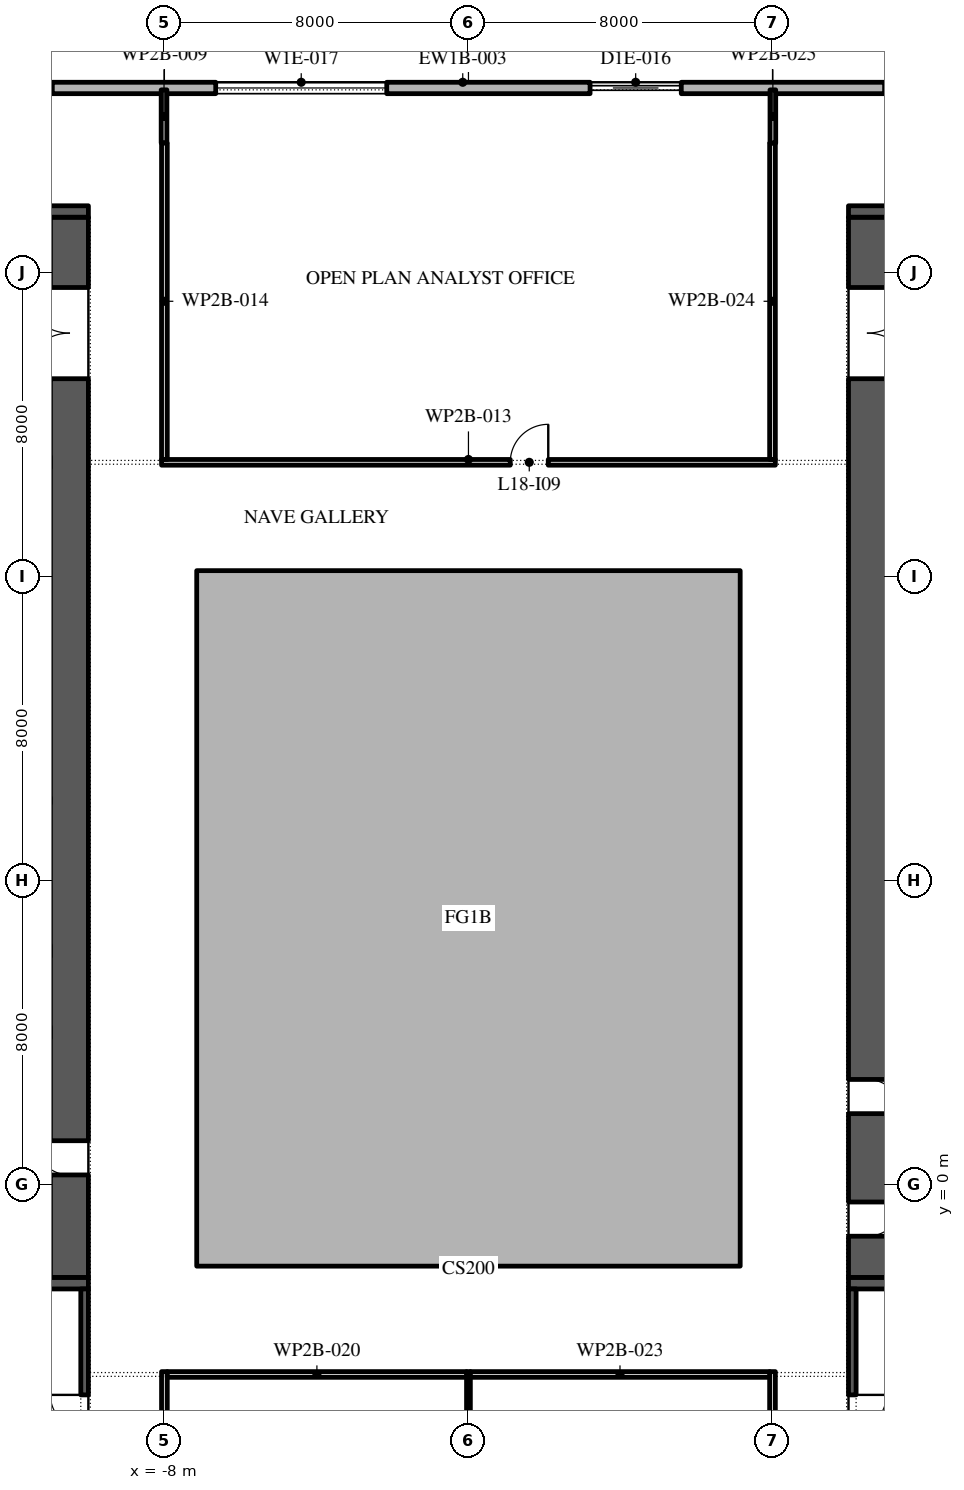
"""IFC4 building model, lengths in metres.
Left out: names, types, materials, properties, quantities, classifications, styles, units other than length and angle.
Written with IfcOpenShell. Run it as: python <this file> out.ifc"""

import sys

from ifc_helpers import new_model, si_unit, direction, frame, frame_2d, origin, place, context, subcontext, project, spatial, polyline, rectangle, outline, extrude, element, fill, save


model = new_model("IFC4")
c1 = context("Model", 3, precision=1e-05, world=origin(), true_north=direction((0.0, 1.0)))
c2 = subcontext(c1, "Body", "Model", "MODEL_VIEW")
j1 = project(units=[si_unit("LENGTHUNIT", "METRE"), si_unit("PLANEANGLEUNIT", "RADIAN")], contexts=[c1])
p1 = place(None, origin())
s1 = spatial("IfcSite", under=j1, at=p1, CompositionType="ELEMENT")
p2 = place(p1, origin())
s2 = spatial("IfcBuilding", under=s1, at=p2, CompositionType="ELEMENT")
p3 = place(p2, frame((0.0, 0.0, 85.8)))
s3 = spatial("IfcBuildingStorey", under=s2, at=p3, CompositionType="ELEMENT", Elevation=85.8)
p4 = place(p3, origin())
e1 = element("IfcWall", 1, at=p4, inside=s3, PredefinedType="STANDARD", context=c2, shape_type="SweptSolid", body=[
    extrude(outline(polyline([(-7.15, -2.15), (7.15, -2.15), (7.15, 16.15), (-7.15, 16.15), (-7.15, -2.15)]), holes=[polyline([(-7.0, -2.0), (-7.0, 16.0), (7.0, 16.0), (7.0, -2.0), (-7.0, -2.0)])]), origin(), (0.0, 0.0, 1.0), 3.95),
])
p5 = place(p3, frame((26.1, 28.85, 0.0), z_axis=(0.0, 0.0, 1.0), x_axis=(-1.0, 0.0, 0.0)))
e2 = element("IfcWall", 2, at=p5, inside=s3, PredefinedType="STANDARD", context=c2, shape_type="SweptSolid", body=[
    extrude(rectangle(XDim=52.5, YDim=0.3, at=frame_2d((26.25, 0.0))), origin(), (0.0, 0.0, 1.0), 3.95),
])
p6 = place(p5, frame((2.0, 0.0, 0.45)))
e3 = element("IfcOpeningElement", 3, at=p6, cuts=e2, PredefinedType="OPENING", context=c2, shape_type="SweptSolid", body=[
    extrude(rectangle(XDim=4.5, YDim=2.825, at=frame_2d((2.25, 1.413))), frame((0.0, 0.16, 0.0), z_axis=(0.0, -1.0, 0.0), x_axis=(1.0, 0.0, 0.0)), (0.0, 0.0, 1.0), 0.32),
])
p7 = place(p5, frame((10.65, 0.0, 0.45)))
e4 = element("IfcOpeningElement", 4, at=p7, cuts=e2, PredefinedType="OPENING", context=c2, shape_type="SweptSolid", body=[
    extrude(rectangle(XDim=4.5, YDim=3.05, at=frame_2d((2.25, 1.525))), frame((0.0, 0.16, 0.0), z_axis=(0.0, -1.0, 0.0), x_axis=(1.0, 0.0, 0.0)), (0.0, 0.0, 1.0), 0.32),
])
p8 = place(p5, frame((20.5, 0.0, 0.0)))
e5 = element("IfcOpeningElement", 5, at=p8, cuts=e2, PredefinedType="OPENING", context=c2, shape_type="SweptSolid", body=[
    extrude(rectangle(XDim=2.4, YDim=3.275, at=frame_2d((1.2, 1.637))), frame((0.0, 0.16, 0.0), z_axis=(0.0, -1.0, 0.0), x_axis=(1.0, 0.0, 0.0)), (0.0, 0.0, 1.0), 0.32),
])
p9 = place(p5, frame((28.25, 0.0, 0.45)))
e6 = element("IfcOpeningElement", 6, at=p9, cuts=e2, PredefinedType="OPENING", context=c2, shape_type="SweptSolid", body=[
    extrude(rectangle(XDim=4.5, YDim=2.825, at=frame_2d((2.25, 1.413))), frame((0.0, 0.16, 0.0), z_axis=(0.0, -1.0, 0.0), x_axis=(1.0, 0.0, 0.0)), (0.0, 0.0, 1.0), 0.32),
])
p10 = place(p5, frame((37.05, 0.0, 0.45)))
e7 = element("IfcOpeningElement", 7, at=p10, cuts=e2, PredefinedType="OPENING", context=c2, shape_type="SweptSolid", body=[
    extrude(rectangle(XDim=4.5, YDim=3.05, at=frame_2d((2.25, 1.525))), frame((0.0, 0.16, 0.0), z_axis=(0.0, -1.0, 0.0), x_axis=(1.0, 0.0, 0.0)), (0.0, 0.0, 1.0), 0.32),
])
p11 = place(p5, frame((45.85, 0.0, 0.45)))
e8 = element("IfcOpeningElement", 8, at=p11, cuts=e2, PredefinedType="OPENING", context=c2, shape_type="SweptSolid", body=[
    extrude(rectangle(XDim=4.5, YDim=2.825, at=frame_2d((2.25, 1.413))), frame((0.0, 0.16, 0.0), z_axis=(0.0, -1.0, 0.0), x_axis=(1.0, 0.0, 0.0)), (0.0, 0.0, 1.0), 0.32),
])
p12 = place(p3, frame((-10.5, -2.45, 0.0), z_axis=(0.0, 0.0, 1.0), x_axis=(0.0, 1.0, 0.0)))
e9 = element("IfcWall", 9, at=p12, inside=s3, PredefinedType="SHEAR", context=c2, shape_type="SweptSolid", body=[
    extrude(rectangle(XDim=27.9, YDim=1.0, at=frame_2d((13.95, 0.0))), origin(), (0.0, 0.0, 1.0), 3.95),
])
p13 = place(p12, frame((23.65, 0.0, 0.0)))
e10 = element("IfcOpeningElement", 10, at=p13, cuts=e9, PredefinedType="OPENING", context=c2, shape_type="SweptSolid", body=[
    extrude(rectangle(XDim=2.4, YDim=2.1, at=frame_2d((1.2, 1.05))), frame((0.0, 0.51, 0.0), z_axis=(0.0, -1.0, 0.0), x_axis=(1.0, 0.0, 0.0)), (0.0, 0.0, 1.0), 1.02),
])
p14 = place(p12, frame((2.7, 0.0, 0.0)))
e11 = element("IfcOpeningElement", 11, at=p14, cuts=e9, PredefinedType="OPENING", context=c2, shape_type="SweptSolid", body=[
    extrude(rectangle(XDim=0.9, YDim=2.1, at=frame_2d((0.45, 1.05))), frame((0.0, 0.51, 0.0), z_axis=(0.0, -1.0, 0.0), x_axis=(1.0, 0.0, 0.0)), (0.0, 0.0, 1.0), 1.02),
])
for number, where, z_axis, x_axis in (
    (12, (-22.0, -2.6, 0.0), (0.0, 0.0, 1.0), (1.0, 0.0, 0.0)),
    (13, (-22.0, 25.6, 0.0), (0.0, 0.0, 1.0), (1.0, 0.0, 0.0)),
):
    element("IfcWall", number, at=place(p3, frame(where, z_axis=z_axis, x_axis=x_axis)), inside=s3, PredefinedType="SHEAR", context=c2, shape_type="SweptSolid", body=[
        extrude(rectangle(XDim=12.0, YDim=0.3, at=frame_2d((6.0, 0.0))), origin(), (0.0, 0.0, 1.0), 3.95),
    ])
p15 = place(p3, frame((-10.1, -15.8, 0.0), z_axis=(0.0, 0.0, 1.0), x_axis=(0.0, 1.0, 0.0)))
e14 = element("IfcWall", 14, at=p15, inside=s3, PredefinedType="SHEAR", context=c2, shape_type="SweptSolid", body=[
    extrude(rectangle(XDim=13.05, YDim=0.2, at=frame_2d((6.525, 0.0))), origin(), (0.0, 0.0, 1.0), 3.95),
])
p16 = place(p15, frame((1.175, 0.0, 0.0)))
e15 = element("IfcOpeningElement", 15, at=p16, cuts=e14, PredefinedType="OPENING", context=c2, shape_type="SweptSolid", body=[
    extrude(rectangle(XDim=0.9, YDim=2.1, at=frame_2d((0.45, 1.05))), frame((0.0, 0.11, 0.0), z_axis=(0.0, -1.0, 0.0), x_axis=(1.0, 0.0, 0.0)), (0.0, 0.0, 1.0), 0.22),
])
p17 = place(p15, frame((4.413, 0.0, 0.0)))
e16 = element("IfcOpeningElement", 16, at=p17, cuts=e14, PredefinedType="OPENING", context=c2, shape_type="SweptSolid", body=[
    extrude(rectangle(XDim=1.0, YDim=2.1, at=frame_2d((0.5, 1.05))), frame((0.0, 0.11, 0.0), z_axis=(0.0, -1.0, 0.0), x_axis=(1.0, 0.0, 0.0)), (0.0, 0.0, 1.0), 0.22),
])
p18 = place(p15, frame((9.363, 0.0, 0.0)))
e17 = element("IfcOpeningElement", 17, at=p18, cuts=e14, PredefinedType="OPENING", context=c2, shape_type="SweptSolid", body=[
    extrude(rectangle(XDim=0.9, YDim=2.1, at=frame_2d((0.45, 1.05))), frame((0.0, 0.11, 0.0), z_axis=(0.0, -1.0, 0.0), x_axis=(1.0, 0.0, 0.0)), (0.0, 0.0, 1.0), 0.22),
])
p19 = place(p3, frame((10.5, -2.45, 0.0), z_axis=(0.0, 0.0, 1.0), x_axis=(0.0, 1.0, 0.0)))
e18 = element("IfcWall", 18, at=p19, inside=s3, PredefinedType="SHEAR", context=c2, shape_type="SweptSolid", body=[
    extrude(rectangle(XDim=27.9, YDim=1.0, at=frame_2d((13.95, 0.0))), origin(), (0.0, 0.0, 1.0), 3.95),
])
p20 = place(p19, frame((23.65, 0.0, 0.0)))
e19 = element("IfcOpeningElement", 19, at=p20, cuts=e18, PredefinedType="OPENING", context=c2, shape_type="SweptSolid", body=[
    extrude(rectangle(XDim=2.4, YDim=2.1, at=frame_2d((1.2, 1.05))), frame((0.0, 0.51, 0.0), z_axis=(0.0, -1.0, 0.0), x_axis=(1.0, 0.0, 0.0)), (0.0, 0.0, 1.0), 1.02),
])
p21 = place(p19, frame((1.087, 0.0, 0.0)))
e20 = element("IfcOpeningElement", 20, at=p21, cuts=e18, PredefinedType="OPENING", context=c2, shape_type="SweptSolid", body=[
    extrude(rectangle(XDim=0.9, YDim=2.1, at=frame_2d((0.45, 1.05))), frame((0.0, 0.51, 0.0), z_axis=(0.0, -1.0, 0.0), x_axis=(1.0, 0.0, 0.0)), (0.0, 0.0, 1.0), 1.02),
])
p22 = place(p19, frame((4.312, 0.0, 0.0)))
e21 = element("IfcOpeningElement", 21, at=p22, cuts=e18, PredefinedType="OPENING", context=c2, shape_type="SweptSolid", body=[
    extrude(rectangle(XDim=0.9, YDim=2.1, at=frame_2d((0.45, 1.05))), frame((0.0, 0.51, 0.0), z_axis=(0.0, -1.0, 0.0), x_axis=(1.0, 0.0, 0.0)), (0.0, 0.0, 1.0), 1.02),
])
for number, where, z_axis, x_axis in (
    (22, (10.0, -2.6, 0.0), (0.0, 0.0, 1.0), (1.0, 0.0, 0.0)),
    (23, (10.0, 25.6, 0.0), (0.0, 0.0, 1.0), (1.0, 0.0, 0.0)),
):
    element("IfcWall", number, at=place(p3, frame(where, z_axis=z_axis, x_axis=x_axis)), inside=s3, PredefinedType="SHEAR", context=c2, shape_type="SweptSolid", body=[
        extrude(rectangle(XDim=12.0, YDim=0.3, at=frame_2d((6.0, 0.0))), origin(), (0.0, 0.0, 1.0), 3.95),
    ])
p23 = place(p3, frame((10.1, -15.8, 0.0), z_axis=(0.0, 0.0, 1.0), x_axis=(0.0, 1.0, 0.0)))
e24 = element("IfcWall", 24, at=p23, inside=s3, PredefinedType="SHEAR", context=c2, shape_type="SweptSolid", body=[
    extrude(rectangle(XDim=13.05, YDim=0.2, at=frame_2d((6.525, 0.0))), origin(), (0.0, 0.0, 1.0), 3.95),
])
p24 = place(p23, frame((2.762, 0.0, 0.0)))
e25 = element("IfcOpeningElement", 25, at=p24, cuts=e24, PredefinedType="OPENING", context=c2, shape_type="SweptSolid", body=[
    extrude(rectangle(XDim=0.9, YDim=2.1, at=frame_2d((0.45, 1.05))), frame((0.0, 0.11, 0.0), z_axis=(0.0, -1.0, 0.0), x_axis=(1.0, 0.0, 0.0)), (0.0, 0.0, 1.0), 0.22),
])
p25 = place(p23, frame((9.363, 0.0, 0.0)))
e26 = element("IfcOpeningElement", 26, at=p25, cuts=e24, PredefinedType="OPENING", context=c2, shape_type="SweptSolid", body=[
    extrude(rectangle(XDim=0.9, YDim=2.1, at=frame_2d((0.45, 1.05))), frame((0.0, 0.11, 0.0), z_axis=(0.0, -1.0, 0.0), x_axis=(1.0, 0.0, 0.0)), (0.0, 0.0, 1.0), 0.22),
])
p26 = place(p3, frame((-8.01, 28.8, 0.0), z_axis=(0.0, 0.0, 1.0), x_axis=(0.0, -1.0, 0.0)))
e27 = element("IfcWall", 27, at=p26, inside=s3, PredefinedType="PARTITIONING", context=c2, shape_type="SweptSolid", body=[
    extrude(rectangle(XDim=1.4, YDim=0.15, at=frame_2d((0.7, 0.0))), origin(), (0.0, 0.0, 1.0), 3.95),
])
p27 = place(p3, frame((-8.0, -4.925, 0.0), z_axis=(0.0, 0.0, 1.0), x_axis=(0.0, -1.0, 0.0)))
e28 = element("IfcWall", 28, at=p27, inside=s3, PredefinedType="PARTITIONING", context=c2, shape_type="SweptSolid", body=[
    extrude(rectangle(XDim=9.625, YDim=0.15, at=frame_2d((4.812, 0.0))), origin(), (0.0, 0.0, 1.0), 3.95),
])
p28 = place(p27, frame((6.175, 0.0, 0.0)))
e29 = element("IfcOpeningElement", 29, at=p28, cuts=e28, PredefinedType="OPENING", context=c2, shape_type="SweptSolid", body=[
    extrude(rectangle(XDim=1.0, YDim=2.1, at=frame_2d((0.5, 1.05))), frame((0.0, 0.085, 0.0), z_axis=(0.0, -1.0, 0.0), x_axis=(1.0, 0.0, 0.0)), (0.0, 0.0, 1.0), 0.17),
])
p29 = place(p3, frame((-8.075, 19.0, 0.0), z_axis=(0.0, 0.0, 1.0), x_axis=(1.0, 0.0, 0.0)))
e30 = element("IfcWall", 30, at=p29, inside=s3, PredefinedType="PARTITIONING", context=c2, shape_type="SweptSolid", body=[
    extrude(rectangle(XDim=16.15, YDim=0.15, at=frame_2d((8.075, 0.0))), origin(), (0.0, 0.0, 1.0), 3.95),
])
p30 = place(p29, frame((9.175, 0.0, 0.0)))
e31 = element("IfcOpeningElement", 31, at=p30, cuts=e30, PredefinedType="OPENING", context=c2, shape_type="SweptSolid", body=[
    extrude(rectangle(XDim=1.0, YDim=2.1, at=frame_2d((0.5, 1.05))), frame((0.0, 0.085, 0.0), z_axis=(0.0, -1.0, 0.0), x_axis=(1.0, 0.0, 0.0)), (0.0, 0.0, 1.0), 0.17),
])
p31 = place(p3, frame((-8.0, 27.4, 0.0), z_axis=(0.0, 0.0, 1.0), x_axis=(0.0, -1.0, 0.0)))
e32 = element("IfcWall", 32, at=p31, inside=s3, PredefinedType="PARTITIONING", context=c2, shape_type="SweptSolid", body=[
    extrude(rectangle(XDim=8.325, YDim=0.15, at=frame_2d((4.163, 0.0))), origin(), (0.0, 0.0, 1.0), 3.95),
])
p32 = place(p3, frame((0.0, -14.05, 0.0), z_axis=(0.0, 0.0, 1.0), x_axis=(0.0, 1.0, 0.0)))
e33 = element("IfcWall", 33, at=p32, inside=s3, PredefinedType="PARTITIONING", context=c2, shape_type="SweptSolid", body=[
    extrude(rectangle(XDim=9.125, YDim=0.1, at=frame_2d((4.562, 0.0))), origin(), (0.0, 0.0, 1.0), 3.95),
])
p33 = place(p3, frame((-0.05, -5.0, 0.0), z_axis=(0.0, 0.0, 1.0), x_axis=(-1.0, 0.0, 0.0)))
e34 = element("IfcWall", 34, at=p33, inside=s3, PredefinedType="PARTITIONING", context=c2, shape_type="SweptSolid", body=[
    extrude(rectangle(XDim=7.875, YDim=0.15, at=frame_2d((3.938, 0.0))), origin(), (0.0, 0.0, 1.0), 3.95),
])
p34 = place(p3, frame((8.0, -13.95, 0.0), z_axis=(0.0, 0.0, 1.0), x_axis=(0.0, 1.0, 0.0)))
e35 = element("IfcWall", 35, at=p34, inside=s3, PredefinedType="PARTITIONING", context=c2, shape_type="SweptSolid", body=[
    extrude(rectangle(XDim=9.025, YDim=0.15, at=frame_2d((4.512, 0.0))), origin(), (0.0, 0.0, 1.0), 3.95),
])
p35 = place(p34, frame((4.05, 0.0, 0.0)))
e36 = element("IfcOpeningElement", 36, at=p35, cuts=e35, PredefinedType="OPENING", context=c2, shape_type="SweptSolid", body=[
    extrude(rectangle(XDim=1.0, YDim=2.1, at=frame_2d((0.5, 1.05))), frame((0.0, 0.085, 0.0), z_axis=(0.0, -1.0, 0.0), x_axis=(1.0, 0.0, 0.0)), (0.0, 0.0, 1.0), 0.17),
])
p36 = place(p3, frame((7.925, -5.0, 0.0), z_axis=(0.0, 0.0, 1.0), x_axis=(-1.0, 0.0, 0.0)))
e37 = element("IfcWall", 37, at=p36, inside=s3, PredefinedType="PARTITIONING", context=c2, shape_type="SweptSolid", body=[
    extrude(rectangle(XDim=7.875, YDim=0.15, at=frame_2d((3.938, 0.0))), origin(), (0.0, 0.0, 1.0), 3.95),
])
p37 = place(p3, frame((8.0, 19.075, 0.0), z_axis=(0.0, 0.0, 1.0), x_axis=(0.0, 1.0, 0.0)))
e38 = element("IfcWall", 38, at=p37, inside=s3, PredefinedType="PARTITIONING", context=c2, shape_type="SweptSolid", body=[
    extrude(rectangle(XDim=8.325, YDim=0.15, at=frame_2d((4.163, 0.0))), origin(), (0.0, 0.0, 1.0), 3.95),
])
p38 = place(p3, frame((8.01, 27.4, 0.0), z_axis=(0.0, 0.0, 1.0), x_axis=(0.0, 1.0, 0.0)))
e39 = element("IfcWall", 39, at=p38, inside=s3, PredefinedType="PARTITIONING", context=c2, shape_type="SweptSolid", body=[
    extrude(rectangle(XDim=1.4, YDim=0.15, at=frame_2d((0.7, 0.0))), origin(), (0.0, 0.0, 1.0), 3.95),
])
p39 = place(p8, origin())
e40 = element("IfcDoor", 40, at=p39, inside=s3, OperationType="DOUBLE_DOOR_SLIDING", PredefinedType="DOOR", context=c2, shape_type="SweptSolid", body=[
    extrude(rectangle(XDim=2.4, YDim=3.275, at=frame_2d((1.2, 1.637))), frame((0.0, 0.025, 0.0), z_axis=(0.0, -1.0, 0.0), x_axis=(1.0, 0.0, 0.0)), (0.0, 0.0, 1.0), 0.05),
])
fill(e5, e40)
p40 = place(p9, origin())
e41 = element("IfcWindow", 41, at=p40, inside=s3, PartitioningType="DOUBLE_PANEL_VERTICAL", PredefinedType="WINDOW", context=c2, shape_type="SweptSolid", body=[
    extrude(rectangle(XDim=4.5, YDim=2.825, at=frame_2d((2.25, 1.413))), frame((0.0, 0.03, 0.0), z_axis=(0.0, -1.0, 0.0), x_axis=(1.0, 0.0, 0.0)), (0.0, 0.0, 1.0), 0.06),
])
fill(e6, e41)
p41 = place(p13, origin())
e42 = element("IfcDoor", 42, at=p41, inside=s3, OperationType="DOUBLE_DOOR_SINGLE_SWING", PredefinedType="DOOR", context=c2, shape_type="SweptSolid", body=[
    extrude(rectangle(XDim=2.4, YDim=2.1, at=frame_2d((1.2, 1.05))), frame((0.0, 0.025, 0.0), z_axis=(0.0, -1.0, 0.0), x_axis=(1.0, 0.0, 0.0)), (0.0, 0.0, 1.0), 0.05),
])
fill(e10, e42)
p42 = place(p18, origin())
e43 = element("IfcDoor", 43, at=p42, inside=s3, OperationType="SINGLE_SWING_LEFT", PredefinedType="DOOR", context=c2, shape_type="SweptSolid", body=[
    extrude(rectangle(XDim=0.9, YDim=2.1, at=frame_2d((0.45, 1.05))), frame((0.0, 0.1, 0.0), z_axis=(0.0, -1.0, 0.0), x_axis=(1.0, 0.0, 0.0)), (0.0, 0.0, 1.0), 0.05),
])
fill(e17, e43)
p43 = place(p20, frame((2.4, 0.0, 0.0), z_axis=(0.0, 0.0, 1.0), x_axis=(-1.0, 0.0, 0.0)))
e44 = element("IfcDoor", 44, at=p43, inside=s3, OperationType="DOUBLE_DOOR_SINGLE_SWING", PredefinedType="DOOR", context=c2, shape_type="SweptSolid", body=[
    extrude(rectangle(XDim=2.4, YDim=2.1, at=frame_2d((1.2, 1.05))), frame((0.0, 0.025, 0.0), z_axis=(0.0, -1.0, 0.0), x_axis=(1.0, 0.0, 0.0)), (0.0, 0.0, 1.0), 0.05),
])
fill(e19, e44)
p44 = place(p25, frame((0.9, -0.15, 0.0), z_axis=(0.0, 0.0, 1.0), x_axis=(-1.0, 0.0, 0.0)))
e45 = element("IfcDoor", 45, at=p44, inside=s3, OperationType="SINGLE_SWING_RIGHT", PredefinedType="DOOR", context=c2, shape_type="SweptSolid", body=[
    extrude(rectangle(XDim=0.9, YDim=2.1, at=frame_2d((0.45, 1.05))), frame((0.0, -0.05, 0.0), z_axis=(0.0, -1.0, 0.0), x_axis=(1.0, 0.0, 0.0)), (0.0, 0.0, 1.0), 0.05),
])
fill(e26, e45)
p45 = place(p30, origin())
e46 = element("IfcDoor", 46, at=p45, inside=s3, OperationType="SINGLE_SWING_LEFT", PredefinedType="DOOR", context=c2, shape_type="SweptSolid", body=[
    extrude(rectangle(XDim=1.0, YDim=2.1, at=frame_2d((0.5, 1.05))), frame((0.0, 0.025, 0.0), z_axis=(0.0, -1.0, 0.0), x_axis=(1.0, 0.0, 0.0)), (0.0, 0.0, 1.0), 0.05),
])
fill(e31, e46)
save(model, sys.argv[1])
